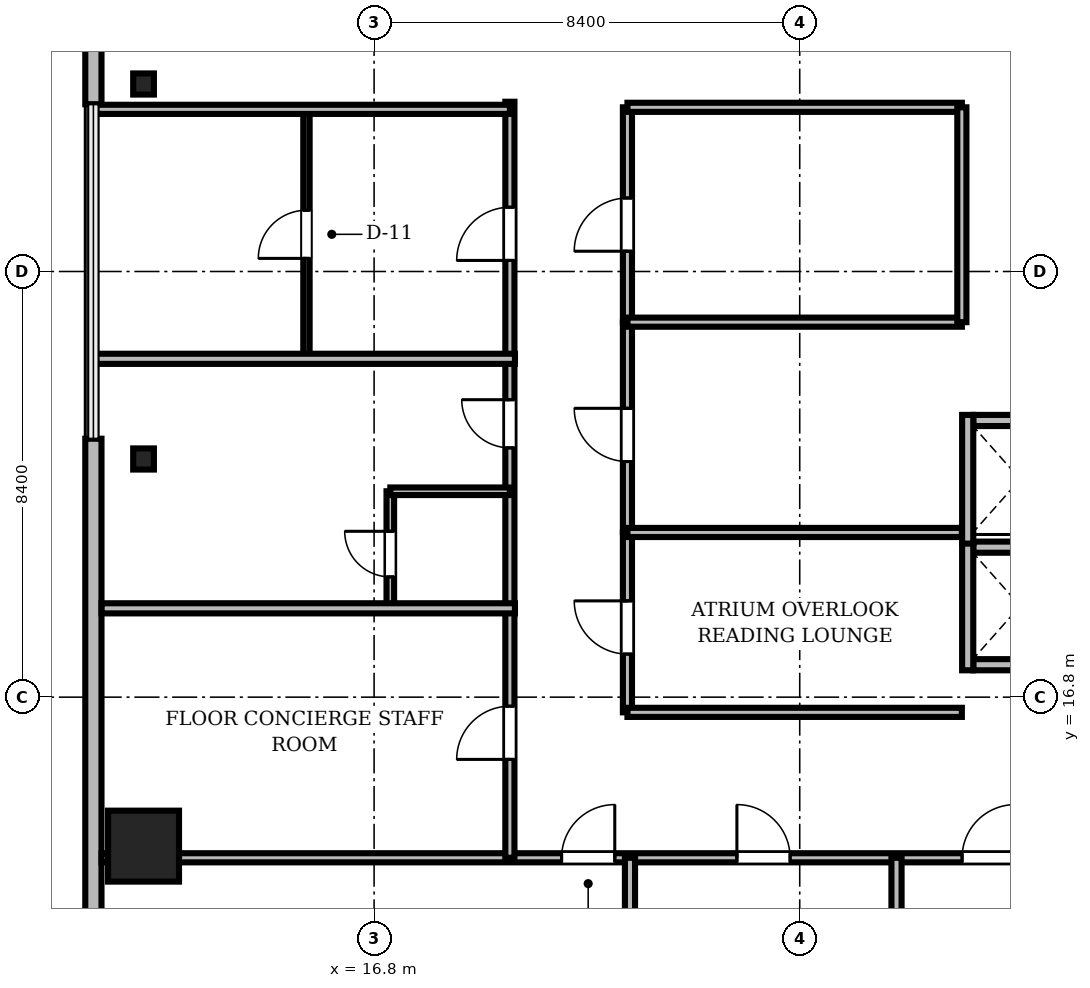
"""IFC4 building model, lengths in metres.
Left out: names, types, materials, properties, quantities, classifications, styles, units other than length and angle.
Written with IfcOpenShell. Run it as: python <this file> out.ifc"""

import sys

from ifc_helpers import new_model, si_unit, direction, frame, frame_2d, origin, origin_2d, place, context, subcontext, project, spatial, rectangle, i_section, extrude, source, transform, mapped, element, fill, save


model = new_model("IFC4")
c1 = context("Model", 3, precision=1e-05, world=origin(), true_north=direction((0.0, 1.0)))
c2 = subcontext(c1, "Body", "Model", "MODEL_VIEW")
j1 = project(units=[si_unit("LENGTHUNIT", "METRE"), si_unit("PLANEANGLEUNIT", "RADIAN")], contexts=[c1])
p1 = place(None, origin())
s1 = spatial("IfcSite", under=j1, at=p1, CompositionType="ELEMENT")
p2 = place(p1, origin())
s2 = spatial("IfcBuilding", under=s1, at=p2, CompositionType="ELEMENT")
p3 = place(p2, frame((0.0, 0.0, 196.05)))
s3 = spatial("IfcBuildingStorey", under=s2, at=p3, CompositionType="ELEMENT", Elevation=196.05)
m1 = source(origin(), c2, "Body", "SweptSolid", [
    extrude(rectangle(XDim=1.4, YDim=1.4, at=origin_2d()), origin(), (0.0, 0.0, 1.0), 3.53),
])
p4 = place(p3, frame((12.25, 13.86, 0.0), z_axis=(0.0, 0.0, 1.0), x_axis=(1.0, 0.0, 0.0)))
e1 = element("IfcColumn", 1, at=p4, inside=s3, PredefinedType="COLUMN", context=c2, shape_type="MappedRepresentation", body=[
    mapped(m1, transform((0.0, 0.0, 0.0), scale=1.0)),
])
m2 = source(origin(), c2, "Body", "SweptSolid", [
    extrude(i_section(OverallWidth=0.409, OverallDepth=0.417, WebThickness=0.021, FlangeThickness=0.033, FilletRadius=0.015, at=origin_2d()), origin(), (0.0, 0.0, 1.0), 3.53),
])
for number, where, z_axis, x_axis in (
    (2, (12.25, 28.9, 0.0), (0.0, 0.0, 1.0), (1.0, 0.0, 0.0)),
    (3, (12.25, 21.5, 0.0), (0.0, 0.0, 1.0), (1.0, 0.0, 0.0)),
):
    element("IfcColumn", number, at=place(p3, frame(where, z_axis=z_axis, x_axis=x_axis)), inside=s3, PredefinedType="COLUMN", context=c2, shape_type="MappedRepresentation", body=[
        mapped(m2, transform((0.0, 0.0, 0.0), scale=1.0)),
    ])
m3 = source(origin(), c2, "Body", "SweptSolid", [
    extrude(rectangle(XDim=15.6, YDim=0.32, at=frame_2d((7.8, 0.0))), origin(), (0.0, 0.0, 1.0), 3.53),
])
p5 = place(p3, frame((11.26, 44.1, 0.0), z_axis=(0.0, 0.0, 1.0), x_axis=(0.0, -1.0, 0.0)))
e4 = element("IfcWall", 4, at=p5, inside=s3, PredefinedType="SOLIDWALL", context=c2, shape_type="MappedRepresentation", body=[
    mapped(m3, transform((0.0, 0.0, 0.0), scale=1.0)),
])
m4 = source(origin(), c2, "Body", "SweptSolid", [
    extrude(rectangle(XDim=1.4, YDim=2.3, at=frame_2d((0.7, 1.15))), frame((0.0, 0.17, 0.0), z_axis=(0.0, -1.0, 0.0), x_axis=(1.0, 0.0, 0.0)), (0.0, 0.0, 1.0), 0.34),
])
p6 = place(p5, frame((9.61, 0.0, 0.0)))
e5 = element("IfcOpeningElement", 5, at=p6, cuts=e4, PredefinedType="OPENING", context=c2, shape_type="MappedRepresentation", body=[
    mapped(m4, transform((0.0, 0.0, 0.0), scale=1.0)),
])
m5 = source(origin(), c2, "Body", "SweptSolid", [
    extrude(rectangle(XDim=2.8, YDim=2.4, at=frame_2d((1.4, 1.2))), frame((0.0, 0.17, 0.0), z_axis=(0.0, -1.0, 0.0), x_axis=(1.0, 0.0, 0.0)), (0.0, 0.0, 1.0), 0.34),
])
p7 = place(p5, frame((2.705, 0.0, 0.72)))
e6 = element("IfcOpeningElement", 6, at=p7, cuts=e4, PredefinedType="OPENING", context=c2, shape_type="MappedRepresentation", body=[
    mapped(m5, transform((0.0, 0.0, 0.0), scale=1.0)),
])
m6 = source(origin(), c2, "Body", "SweptSolid", [
    extrude(rectangle(XDim=15.6, YDim=0.32, at=frame_2d((7.8, 0.0))), origin(), (0.0, 0.0, 1.0), 3.53),
])
p8 = place(p3, frame((11.26, 21.9, 0.0), z_axis=(0.0, 0.0, 1.0), x_axis=(0.0, -1.0, 0.0)))
e7 = element("IfcWall", 7, at=p8, inside=s3, PredefinedType="SOLIDWALL", context=c2, shape_type="MappedRepresentation", body=[
    mapped(m6, transform((0.0, 0.0, 0.0), scale=1.0)),
])
p9 = place(p8, frame((10.095, 0.0, 0.72)))
e8 = element("IfcOpeningElement", 8, at=p9, cuts=e7, PredefinedType="OPENING", context=c2, shape_type="MappedRepresentation", body=[
    mapped(m5, transform((0.0, 0.0, 0.0), scale=1.0)),
])
m7 = source(origin(), c2, "Body", "SweptSolid", [
    extrude(rectangle(XDim=1.85, YDim=0.22, at=frame_2d((0.925, 0.0))), origin(), (0.0, 0.0, 1.0), 2.972),
])
p10 = place(p3, frame((28.625, 17.44, 0.0), z_axis=(0.0, 0.0, 1.0), x_axis=(1.0, 0.0, 0.0)))
e9 = element("IfcWall", 9, at=p10, inside=s3, PredefinedType="SOLIDWALL", context=c2, shape_type="MappedRepresentation", body=[
    mapped(m7, transform((0.0, 0.0, 0.0), scale=1.0)),
])
m8 = source(origin(), c2, "Body", "SweptSolid", [
    extrude(rectangle(XDim=1.85, YDim=0.22, at=frame_2d((0.925, 0.0))), origin(), (0.0, 0.0, 1.0), 3.53),
])
p11 = place(p3, frame((28.625, 19.76, 0.0), z_axis=(0.0, 0.0, 1.0), x_axis=(1.0, 0.0, 0.0)))
e10 = element("IfcWall", 10, at=p11, inside=s3, PredefinedType="SOLIDWALL", context=c2, shape_type="MappedRepresentation", body=[
    mapped(m8, transform((0.0, 0.0, 0.0), scale=1.0)),
])
m9 = source(origin(), c2, "Body", "SweptSolid", [
    extrude(rectangle(XDim=2.54, YDim=0.22, at=frame_2d((1.27, 0.0))), origin(), (0.0, 0.0, 1.0), 2.972),
])
p12 = place(p3, frame((28.515, 17.33, 0.0), z_axis=(0.0, 0.0, 1.0), x_axis=(0.0, 1.0, 0.0)))
e11 = element("IfcWall", 11, at=p12, inside=s3, PredefinedType="SOLIDWALL", context=c2, shape_type="MappedRepresentation", body=[
    mapped(m9, transform((0.0, 0.0, 0.0), scale=1.0)),
])
p13 = place(p3, frame((28.625, 22.26, 0.0), z_axis=(0.0, 0.0, 1.0), x_axis=(1.0, 0.0, 0.0)))
e12 = element("IfcWall", 12, at=p13, inside=s3, PredefinedType="SOLIDWALL", context=c2, shape_type="MappedRepresentation", body=[
    mapped(m8, transform((0.0, 0.0, 0.0), scale=1.0)),
])
m10 = source(origin(), c2, "Body", "SweptSolid", [
    extrude(rectangle(XDim=2.54, YDim=0.22, at=frame_2d((1.27, 0.0))), origin(), (0.0, 0.0, 1.0), 3.53),
])
p14 = place(p3, frame((28.515, 19.83, 0.0), z_axis=(0.0, 0.0, 1.0), x_axis=(0.0, 1.0, 0.0)))
e13 = element("IfcWall", 13, at=p14, inside=s3, PredefinedType="SOLIDWALL", context=c2, shape_type="MappedRepresentation", body=[
    mapped(m10, transform((0.0, 0.0, 0.0), scale=1.0)),
])
m11 = source(origin(), c2, "Body", "SweptSolid", [
    extrude(rectangle(XDim=46.156, YDim=0.18, at=frame_2d((23.078, 0.0))), origin(), (0.0, 0.0, 1.0), 2.772),
])
p15 = place(p3, frame((11.422, 13.63, 0.0), z_axis=(0.0, 0.0, 1.0), x_axis=(1.0, 0.0, 0.0)))
e14 = element("IfcWall", 14, at=p15, inside=s3, PredefinedType="PARTITIONING", context=c2, shape_type="MappedRepresentation", body=[
    mapped(m11, transform((0.0, 0.0, 0.0), scale=1.0)),
])
m12 = source(origin(), c2, "Body", "SweptSolid", [
    extrude(rectangle(XDim=1.05, YDim=2.2, at=frame_2d((0.525, 1.1))), frame((0.0, 0.1, 0.0), z_axis=(0.0, -1.0, 0.0), x_axis=(1.0, 0.0, 0.0)), (0.0, 0.0, 1.0), 0.2),
])
p16 = place(p15, frame((9.078, 0.0, 0.0)))
e15 = element("IfcOpeningElement", 15, at=p16, cuts=e14, PredefinedType="OPENING", context=c2, shape_type="MappedRepresentation", body=[
    mapped(m12, transform((0.0, 0.0, 0.0), scale=1.0)),
])
p17 = place(p15, frame((12.538, 0.0, 0.0)))
e16 = element("IfcOpeningElement", 16, at=p17, cuts=e14, PredefinedType="OPENING", context=c2, shape_type="MappedRepresentation", body=[
    mapped(m12, transform((0.0, 0.0, 0.0), scale=1.0)),
])
p18 = place(p15, frame((16.982, 0.0, 0.0)))
e17 = element("IfcOpeningElement", 17, at=p18, cuts=e14, PredefinedType="OPENING", context=c2, shape_type="MappedRepresentation", body=[
    mapped(m12, transform((0.0, 0.0, 0.0), scale=1.0)),
])
p19 = place(p15, frame((21.393, 0.0, 0.0)))
e18 = element("IfcOpeningElement", 18, at=p19, cuts=e14, PredefinedType="OPENING", context=c2, shape_type="MappedRepresentation", body=[
    mapped(m12, transform((0.0, 0.0, 0.0), scale=1.0)),
])
m13 = source(origin(), c2, "Body", "SweptSolid", [
    extrude(rectangle(XDim=0.95, YDim=2.15, at=frame_2d((0.475, 1.075))), frame((0.0, 0.1, 0.0), z_axis=(0.0, -1.0, 0.0), x_axis=(1.0, 0.0, 0.0)), (0.0, 0.0, 1.0), 0.2),
])
p20 = place(p15, frame((27.812, 0.0, 0.0)))
e19 = element("IfcOpeningElement", 19, at=p20, cuts=e14, PredefinedType="OPENING", context=c2, shape_type="MappedRepresentation", body=[
    mapped(m13, transform((0.0, 0.0, 0.0), scale=1.0)),
])
p21 = place(p15, frame((32.531, 0.0, 0.0)))
e20 = element("IfcOpeningElement", 20, at=p21, cuts=e14, PredefinedType="OPENING", context=c2, shape_type="MappedRepresentation", body=[
    mapped(m12, transform((0.0, 0.0, 0.0), scale=1.0)),
])
p22 = place(p15, frame((37.498, 0.0, 0.0)))
e21 = element("IfcOpeningElement", 21, at=p22, cuts=e14, PredefinedType="OPENING", context=c2, shape_type="MappedRepresentation", body=[
    mapped(m12, transform((0.0, 0.0, 0.0), scale=1.0)),
])
m14 = source(origin(), c2, "Body", "SweptSolid", [
    extrude(rectangle(XDim=14.92, YDim=0.18, at=frame_2d((7.46, 0.0))), origin(), (0.0, 0.0, 1.0), 2.972),
])
p23 = place(p3, frame((19.48, 13.63, 0.0), z_axis=(0.0, 0.0, 1.0), x_axis=(0.0, 1.0, 0.0)))
e22 = element("IfcWall", 22, at=p23, inside=s3, PredefinedType="PARTITIONING", context=c2, shape_type="MappedRepresentation", body=[
    mapped(m14, transform((0.0, 0.0, 0.0), scale=1.0)),
])
p24 = place(p23, frame((1.942, 0.0, 0.0)))
e23 = element("IfcOpeningElement", 23, at=p24, cuts=e22, PredefinedType="OPENING", context=c2, shape_type="MappedRepresentation", body=[
    mapped(m12, transform((0.0, 0.0, 0.0), scale=1.0)),
])
p25 = place(p23, frame((8.09, 0.0, 0.0)))
e24 = element("IfcOpeningElement", 24, at=p25, cuts=e22, PredefinedType="OPENING", context=c2, shape_type="MappedRepresentation", body=[
    mapped(m13, transform((0.0, 0.0, 0.0), scale=1.0)),
])
p26 = place(p23, frame((11.788, 0.0, 0.0)))
e25 = element("IfcOpeningElement", 25, at=p26, cuts=e22, PredefinedType="OPENING", context=c2, shape_type="MappedRepresentation", body=[
    mapped(m12, transform((0.0, 0.0, 0.0), scale=1.0)),
])
m15 = source(origin(), c2, "Body", "SweptSolid", [
    extrude(rectangle(XDim=4.923, YDim=0.125, at=frame_2d((2.461, 0.0))), origin(), (0.0, 0.0, 1.0), 3.192),
])
p27 = place(p3, frame((15.465, 23.477, 0.0), z_axis=(0.0, 0.0, 1.0), x_axis=(0.0, 1.0, 0.0)))
e26 = element("IfcWall", 26, at=p27, inside=s3, PredefinedType="PARTITIONING", context=c2, shape_type="MappedRepresentation", body=[
    mapped(m15, transform((0.0, 0.0, 0.0), scale=1.0)),
])
m16 = source(origin(), c2, "Body", "SweptSolid", [
    extrude(rectangle(XDim=0.95, YDim=2.15, at=frame_2d((0.475, 1.075))), frame((0.0, 0.073, 0.0), z_axis=(0.0, -1.0, 0.0), x_axis=(1.0, 0.0, 0.0)), (0.0, 0.0, 1.0), 0.145),
])
p28 = place(p27, frame((1.982, 0.0, 0.0)))
e27 = element("IfcOpeningElement", 27, at=p28, cuts=e26, PredefinedType="OPENING", context=c2, shape_type="MappedRepresentation", body=[
    mapped(m16, transform((0.0, 0.0, 0.0), scale=1.0)),
])
m17 = source(origin(), c2, "Body", "SweptSolid", [
    extrude(rectangle(XDim=4.24, YDim=0.18, at=frame_2d((2.12, 0.0))), origin(), (0.0, 0.0, 1.0), 2.972),
])
p29 = place(p3, frame((21.8, 24.2, 0.0), z_axis=(0.0, 0.0, 1.0), x_axis=(0.0, 1.0, 0.0)))
e28 = element("IfcWall", 28, at=p29, inside=s3, PredefinedType="PARTITIONING", context=c2, shape_type="MappedRepresentation", body=[
    mapped(m17, transform((0.0, 0.0, 0.0), scale=1.0)),
])
p30 = place(p29, frame((1.4, 0.0, 0.0)))
e29 = element("IfcOpeningElement", 29, at=p30, cuts=e28, PredefinedType="OPENING", context=c2, shape_type="MappedRepresentation", body=[
    mapped(m12, transform((0.0, 0.0, 0.0), scale=1.0)),
])
m18 = source(origin(), c2, "Body", "SweptSolid", [
    extrude(rectangle(XDim=4.15, YDim=0.18, at=frame_2d((2.075, 0.0))), origin(), (0.0, 0.0, 1.0), 3.192),
])
p31 = place(p3, frame((21.8, 20.05, 0.0), z_axis=(0.0, 0.0, 1.0), x_axis=(0.0, 1.0, 0.0)))
e30 = element("IfcWall", 30, at=p31, inside=s3, PredefinedType="PARTITIONING", context=c2, shape_type="MappedRepresentation", body=[
    mapped(m18, transform((0.0, 0.0, 0.0), scale=1.0)),
])
p32 = place(p31, frame((1.4, 0.0, 0.0)))
e31 = element("IfcOpeningElement", 31, at=p32, cuts=e30, PredefinedType="OPENING", context=c2, shape_type="MappedRepresentation", body=[
    mapped(m12, transform((0.0, 0.0, 0.0), scale=1.0)),
])
m19 = source(origin(), c2, "Body", "SweptSolid", [
    extrude(rectangle(XDim=3.55, YDim=0.18, at=frame_2d((1.775, 0.0))), origin(), (0.0, 0.0, 1.0), 2.972),
])
p33 = place(p3, frame((21.8, 16.5, 0.0), z_axis=(0.0, 0.0, 1.0), x_axis=(0.0, 1.0, 0.0)))
e32 = element("IfcWall", 32, at=p33, inside=s3, PredefinedType="PARTITIONING", context=c2, shape_type="MappedRepresentation", body=[
    mapped(m19, transform((0.0, 0.0, 0.0), scale=1.0)),
])
p34 = place(p33, frame((1.15, 0.0, 0.0)))
e33 = element("IfcOpeningElement", 33, at=p34, cuts=e32, PredefinedType="OPENING", context=c2, shape_type="MappedRepresentation", body=[
    mapped(m12, transform((0.0, 0.0, 0.0), scale=1.0)),
])
m20 = source(origin(), c2, "Body", "SweptSolid", [
    extrude(rectangle(XDim=2.29, YDim=0.15, at=frame_2d((1.145, 0.0))), origin(), (0.0, 0.0, 1.0), 2.972),
])
p35 = place(p3, frame((17.12, 18.573, 0.0), z_axis=(0.0, 0.0, 1.0), x_axis=(0.0, 1.0, 0.0)))
e34 = element("IfcWall", 34, at=p35, inside=s3, PredefinedType="PARTITIONING", context=c2, shape_type="MappedRepresentation", body=[
    mapped(m20, transform((0.0, 0.0, 0.0), scale=1.0)),
])
m21 = source(origin(), c2, "Body", "SweptSolid", [
    extrude(rectangle(XDim=0.9, YDim=2.1, at=frame_2d((0.45, 1.05))), frame((0.0, 0.085, 0.0), z_axis=(0.0, -1.0, 0.0), x_axis=(1.0, 0.0, 0.0)), (0.0, 0.0, 1.0), 0.17),
])
p36 = place(p35, frame((0.6, 0.0, 0.0)))
e35 = element("IfcOpeningElement", 35, at=p36, cuts=e34, PredefinedType="OPENING", context=c2, shape_type="MappedRepresentation", body=[
    mapped(m21, transform((0.0, 0.0, 0.0), scale=1.0)),
])
m22 = source(origin(), c2, "Body", "SweptSolid", [
    extrude(rectangle(XDim=11.508, YDim=0.2, at=frame_2d((5.754, 0.0))), origin(), (0.0, 0.0, 1.0), 2.772),
])
for number, where, z_axis, x_axis in (
    (36, (21.85, 2.122, 0.0), (0.0, 0.0, 1.0), (0.0, 1.0, 0.0)),
    (37, (27.11, 2.122, 0.0), (0.0, 0.0, 1.0), (0.0, 1.0, 0.0)),
):
    element("IfcWall", number, at=place(p3, frame(where, z_axis=z_axis, x_axis=x_axis)), inside=s3, PredefinedType="PARTITIONING", context=c2, shape_type="MappedRepresentation", body=[
        mapped(m22, transform((0.0, 0.0, 0.0), scale=1.0)),
    ])
m23 = source(origin(), c2, "Body", "SweptSolid", [
    extrude(rectangle(XDim=8.158, YDim=0.2, at=frame_2d((4.079, 0.0))), origin(), (0.0, 0.0, 1.0), 2.772),
])
p37 = place(p3, frame((11.422, 18.553, 0.0), z_axis=(0.0, 0.0, 1.0), x_axis=(1.0, 0.0, 0.0)))
e38 = element("IfcWall", 38, at=p37, inside=s3, PredefinedType="PARTITIONING", context=c2, shape_type="MappedRepresentation", body=[
    mapped(m23, transform((0.0, 0.0, 0.0), scale=1.0)),
])
m24 = source(origin(), c2, "Body", "SweptSolid", [
    extrude(rectangle(XDim=8.35, YDim=0.2, at=frame_2d((4.175, 0.0))), origin(), (0.0, 0.0, 1.0), 2.772),
])
p38 = place(p3, frame((11.23, 23.477, 0.0), z_axis=(0.0, 0.0, 1.0), x_axis=(1.0, 0.0, 0.0)))
e39 = element("IfcWall", 39, at=p38, inside=s3, PredefinedType="PARTITIONING", context=c2, shape_type="MappedRepresentation", body=[
    mapped(m24, transform((0.0, 0.0, 0.0), scale=1.0)),
])
m25 = source(origin(), c2, "Body", "SweptSolid", [
    extrude(rectangle(XDim=8.25, YDim=0.18, at=frame_2d((4.125, 0.0))), origin(), (0.0, 0.0, 1.0), 2.772),
])
p39 = place(p3, frame((11.23, 28.4, 0.0), z_axis=(0.0, 0.0, 1.0), x_axis=(1.0, 0.0, 0.0)))
e40 = element("IfcWall", 40, at=p39, inside=s3, PredefinedType="PARTITIONING", context=c2, shape_type="MappedRepresentation", body=[
    mapped(m25, transform((0.0, 0.0, 0.0), scale=1.0)),
])
m26 = source(origin(), c2, "Body", "SweptSolid", [
    extrude(rectangle(XDim=6.6, YDim=0.18, at=frame_2d((3.3, 0.0))), origin(), (0.0, 0.0, 1.0), 3.53),
])
for number, where, z_axis, x_axis in (
    (41, (21.8, 16.5, 0.0), (0.0, 0.0, 1.0), (1.0, 0.0, 0.0)),
    (42, (21.8, 20.05, 0.0), (0.0, 0.0, 1.0), (1.0, 0.0, 0.0)),
    (43, (21.8, 24.2, 0.0), (0.0, 0.0, 1.0), (1.0, 0.0, 0.0)),
    (44, (21.8, 28.44, 0.0), (0.0, 0.0, 1.0), (1.0, 0.0, 0.0)),
):
    element("IfcWall", number, at=place(p3, frame(where, z_axis=z_axis, x_axis=x_axis)), inside=s3, PredefinedType="PARTITIONING", context=c2, shape_type="MappedRepresentation", body=[
        mapped(m26, transform((0.0, 0.0, 0.0), scale=1.0)),
    ])
p40 = place(p3, frame((28.4, 24.2, 0.0), z_axis=(0.0, 0.0, 1.0), x_axis=(0.0, 1.0, 0.0)))
e45 = element("IfcWall", 45, at=p40, inside=s3, PredefinedType="PARTITIONING", context=c2, shape_type="MappedRepresentation", body=[
    mapped(m17, transform((0.0, 0.0, 0.0), scale=1.0)),
])
m27 = source(origin(), c2, "Body", "SweptSolid", [
    extrude(rectangle(XDim=2.36, YDim=0.15, at=frame_2d((1.18, 0.0))), origin(), (0.0, 0.0, 1.0), 3.53),
])
p41 = place(p3, frame((17.12, 20.863, 0.0), z_axis=(0.0, 0.0, 1.0), x_axis=(1.0, 0.0, 0.0)))
e46 = element("IfcWall", 46, at=p41, inside=s3, PredefinedType="PARTITIONING", context=c2, shape_type="MappedRepresentation", body=[
    mapped(m27, transform((0.0, 0.0, 0.0), scale=1.0)),
])
m28 = source(origin(), c2, "Body", "SweptSolid", [
    extrude(rectangle(XDim=1.05, YDim=2.2, at=frame_2d((0.525, 1.1))), frame((0.0, 0.025, 0.0), z_axis=(0.0, -1.0, 0.0), x_axis=(1.0, 0.0, 0.0)), (0.0, 0.0, 1.0), 0.05),
])
p42 = place(p16, origin())
e47 = element("IfcDoor", 47, at=p42, inside=s3, OperationType="SINGLE_SWING_RIGHT", PredefinedType="DOOR", context=c2, shape_type="MappedRepresentation", body=[
    mapped(m28, transform((0.0, 0.0, 0.0), scale=1.0)),
])
fill(e15, e47)
p43 = place(p17, origin())
e48 = element("IfcDoor", 48, at=p43, inside=s3, OperationType="SINGLE_SWING_LEFT", PredefinedType="DOOR", context=c2, shape_type="MappedRepresentation", body=[
    mapped(m28, transform((0.0, 0.0, 0.0), scale=1.0)),
])
fill(e16, e48)
p44 = place(p18, origin())
e49 = element("IfcDoor", 49, at=p44, inside=s3, OperationType="SINGLE_SWING_RIGHT", PredefinedType="DOOR", context=c2, shape_type="MappedRepresentation", body=[
    mapped(m28, transform((0.0, 0.0, 0.0), scale=1.0)),
])
fill(e17, e49)
p45 = place(p24, origin())
e50 = element("IfcDoor", 50, at=p45, inside=s3, OperationType="SINGLE_SWING_LEFT", PredefinedType="DOOR", context=c2, shape_type="MappedRepresentation", body=[
    mapped(m28, transform((0.0, 0.0, 0.0), scale=1.0)),
])
fill(e23, e50)
m29 = source(origin(), c2, "Body", "SweptSolid", [
    extrude(rectangle(XDim=0.95, YDim=2.15, at=frame_2d((0.475, 1.075))), frame((0.0, 0.025, 0.0), z_axis=(0.0, -1.0, 0.0), x_axis=(1.0, 0.0, 0.0)), (0.0, 0.0, 1.0), 0.05),
])
p46 = place(p25, origin())
e51 = element("IfcDoor", 51, at=p46, inside=s3, OperationType="SINGLE_SWING_RIGHT", PredefinedType="DOOR", context=c2, shape_type="MappedRepresentation", body=[
    mapped(m29, transform((0.0, 0.0, 0.0), scale=1.0)),
])
fill(e24, e51)
p47 = place(p26, origin())
e52 = element("IfcDoor", 52, at=p47, inside=s3, OperationType="SINGLE_SWING_LEFT", PredefinedType="DOOR", context=c2, shape_type="MappedRepresentation", body=[
    mapped(m28, transform((0.0, 0.0, 0.0), scale=1.0)),
])
fill(e25, e52)
p48 = place(p28, origin())
e53 = element("IfcDoor", 53, at=p48, inside=s3, OperationType="SINGLE_SWING_LEFT", PredefinedType="DOOR", context=c2, shape_type="MappedRepresentation", body=[
    mapped(m29, transform((0.0, 0.0, 0.0), scale=1.0)),
])
fill(e27, e53)
p49 = place(p30, origin())
e54 = element("IfcDoor", 54, at=p49, inside=s3, OperationType="SINGLE_SWING_LEFT", PredefinedType="DOOR", context=c2, shape_type="MappedRepresentation", body=[
    mapped(m28, transform((0.0, 0.0, 0.0), scale=1.0)),
])
fill(e29, e54)
p50 = place(p32, origin())
e55 = element("IfcDoor", 55, at=p50, inside=s3, OperationType="SINGLE_SWING_RIGHT", PredefinedType="DOOR", context=c2, shape_type="MappedRepresentation", body=[
    mapped(m28, transform((0.0, 0.0, 0.0), scale=1.0)),
])
fill(e31, e55)
p51 = place(p34, origin())
e56 = element("IfcDoor", 56, at=p51, inside=s3, OperationType="SINGLE_SWING_RIGHT", PredefinedType="DOOR", context=c2, shape_type="MappedRepresentation", body=[
    mapped(m28, transform((0.0, 0.0, 0.0), scale=1.0)),
])
fill(e33, e56)
m30 = source(origin(), c2, "Body", "SweptSolid", [
    extrude(rectangle(XDim=0.9, YDim=2.1, at=frame_2d((0.45, 1.05))), frame((0.0, 0.025, 0.0), z_axis=(0.0, -1.0, 0.0), x_axis=(1.0, 0.0, 0.0)), (0.0, 0.0, 1.0), 0.05),
])
p52 = place(p36, origin())
e57 = element("IfcDoor", 57, at=p52, inside=s3, OperationType="SINGLE_SWING_RIGHT", PredefinedType="DOOR", context=c2, shape_type="MappedRepresentation", body=[
    mapped(m30, transform((0.0, 0.0, 0.0), scale=1.0)),
])
fill(e35, e57)
save(model, sys.argv[1])
